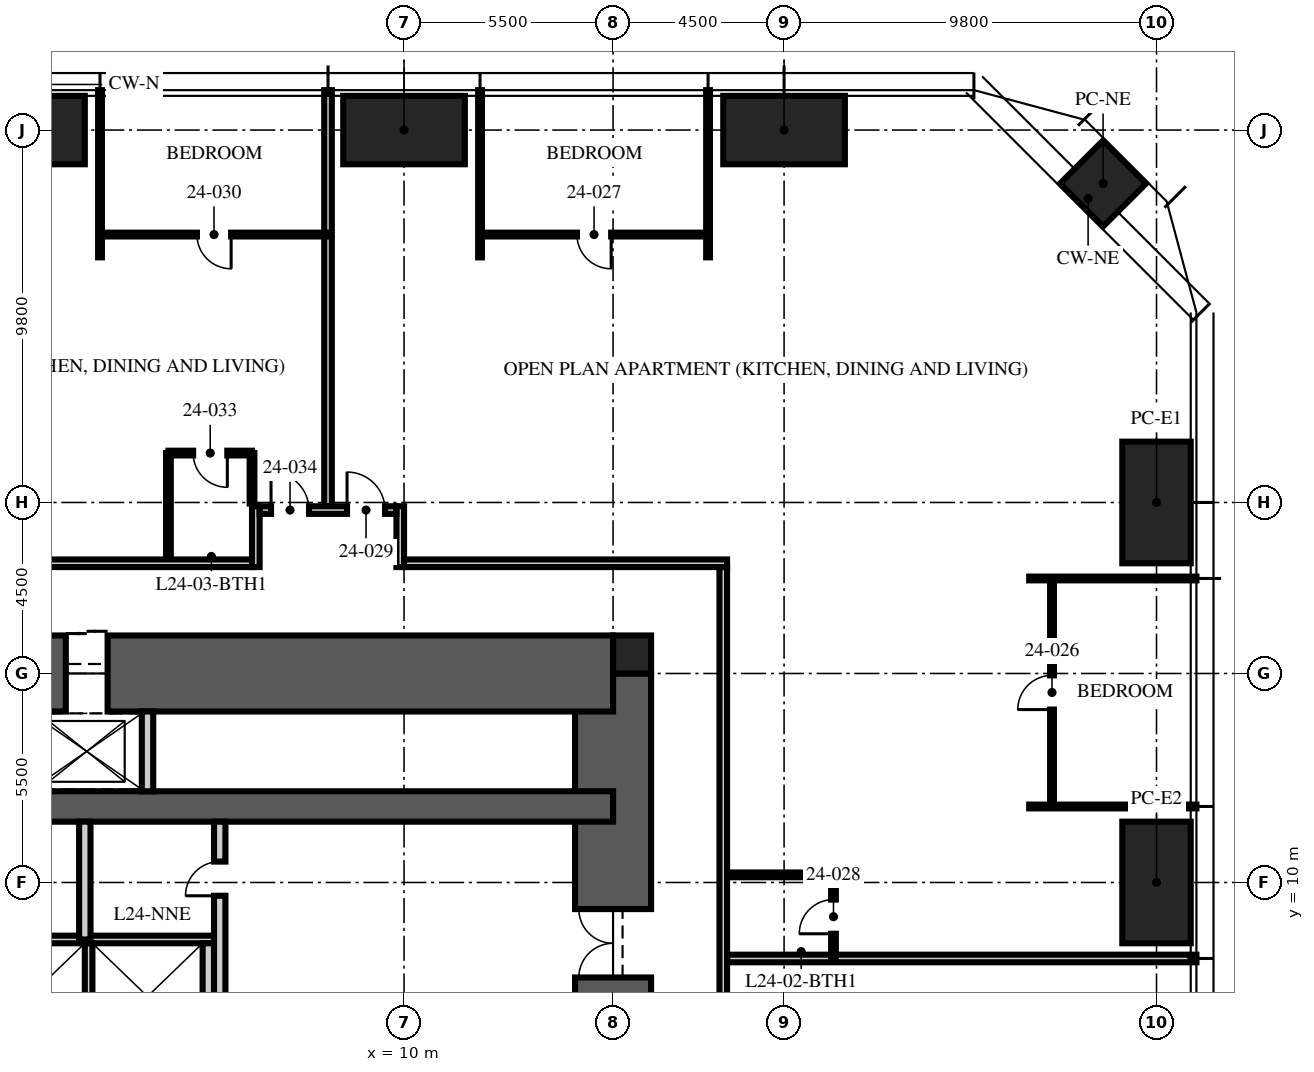
"""IFC4 building model, lengths in metres.
Left out: names, types, materials, properties, quantities, classifications, styles, units other than length and angle.
Written with IfcOpenShell. Run it as: python <this file> out.ifc"""

import sys

from ifc_helpers import new_model, si_unit, direction, frame, frame_2d, origin, origin_2d, place, context, subcontext, project, spatial, rectangle, hollow_rectangle, extrude, element, fill, save


model = new_model("IFC4")
c1 = context("Model", 3, precision=1e-05, world=origin(), true_north=direction((0.0, 1.0)))
c2 = subcontext(c1, "Body", "Model", "MODEL_VIEW")
j1 = project(units=[si_unit("LENGTHUNIT", "METRE"), si_unit("PLANEANGLEUNIT", "RADIAN")], contexts=[c1])
p1 = place(None, origin())
s1 = spatial("IfcSite", under=j1, at=p1, CompositionType="ELEMENT")
p2 = place(p1, origin())
s2 = spatial("IfcBuilding", under=s1, at=p2, CompositionType="ELEMENT")
p3 = place(p2, frame((0.0, 0.0, 96.0)))
s3 = spatial("IfcBuildingStorey", under=s2, at=p3, CompositionType="ELEMENT", Elevation=96.0)
p4 = place(p3, frame((15.5, -15.5, -0.25), z_axis=(0.0, 0.0, 1.0), x_axis=(0.0, 1.0, 0.0)))
e1 = element("IfcWall", 1, at=p4, inside=s3, PredefinedType="SHEAR", context=c2, shape_type="SweptSolid", body=[
    extrude(rectangle(XDim=31.0, YDim=2.0, at=frame_2d((15.5, 0.0))), origin(), (0.0, 0.0, 1.0), 3.65),
])
p5 = place(p4, frame((6.5, 0.0, 0.25)))
e2 = element("IfcOpeningElement", 2, at=p5, cuts=e1, PredefinedType="OPENING", context=c2, shape_type="SweptSolid", body=[
    extrude(rectangle(XDim=1.2, YDim=2.1, at=frame_2d((0.6, 1.05))), frame((0.0, 1.01, 0.0), z_axis=(0.0, -1.0, 0.0), x_axis=(1.0, 0.0, 0.0)), (0.0, 0.0, 1.0), 2.02),
])
p6 = place(p4, frame((23.0, 0.0, 0.25)))
e3 = element("IfcOpeningElement", 3, at=p6, cuts=e1, PredefinedType="OPENING", context=c2, shape_type="SweptSolid", body=[
    extrude(rectangle(XDim=1.8, YDim=2.1, at=frame_2d((0.9, 1.05))), frame((0.0, 1.01, 0.0), z_axis=(0.0, -1.0, 0.0), x_axis=(1.0, 0.0, 0.0)), (0.0, 0.0, 1.0), 2.02),
])
p7 = place(p3, frame((-15.5, 15.5, -0.25), z_axis=(0.0, 0.0, 1.0), x_axis=(1.0, 0.0, 0.0)))
e4 = element("IfcWall", 4, at=p7, inside=s3, PredefinedType="SHEAR", context=c2, shape_type="SweptSolid", body=[
    extrude(rectangle(XDim=31.0, YDim=2.0, at=frame_2d((15.5, 0.0))), origin(), (0.0, 0.0, 1.0), 3.65),
])
p8 = place(p7, frame((10.4, 0.0, 0.25)))
e5 = element("IfcOpeningElement", 5, at=p8, cuts=e4, PredefinedType="OPENING", context=c2, shape_type="SweptSolid", body=[
    extrude(rectangle(XDim=1.1, YDim=2.1, at=frame_2d((0.55, 1.05))), frame((0.0, 1.01, 0.0), z_axis=(0.0, -1.0, 0.0), x_axis=(1.0, 0.0, 0.0)), (0.0, 0.0, 1.0), 2.02),
])
p9 = place(p7, frame((13.5, 0.0, 0.25)))
e6 = element("IfcOpeningElement", 6, at=p9, cuts=e4, PredefinedType="OPENING", context=c2, shape_type="SweptSolid", body=[
    extrude(rectangle(XDim=1.1, YDim=2.1, at=frame_2d((0.55, 1.05))), frame((0.0, 1.01, 0.0), z_axis=(0.0, -1.0, 0.0), x_axis=(1.0, 0.0, 0.0)), (0.0, 0.0, 1.0), 2.02),
])
p10 = place(p7, frame((16.6, 0.0, 0.25)))
e7 = element("IfcOpeningElement", 7, at=p10, cuts=e4, PredefinedType="OPENING", context=c2, shape_type="SweptSolid", body=[
    extrude(rectangle(XDim=1.1, YDim=2.1, at=frame_2d((0.55, 1.05))), frame((0.0, 1.01, 0.0), z_axis=(0.0, -1.0, 0.0), x_axis=(1.0, 0.0, 0.0)), (0.0, 0.0, 1.0), 2.02),
])
p11 = place(p3, frame((-15.5, 12.0, -0.25), z_axis=(0.0, 0.0, 1.0), x_axis=(1.0, 0.0, 0.0)))
e8 = element("IfcWall", 8, at=p11, inside=s3, PredefinedType="SHEAR", context=c2, shape_type="SweptSolid", body=[
    extrude(rectangle(XDim=31.0, YDim=0.8, at=frame_2d((15.5, 0.0))), origin(), (0.0, 0.0, 1.0), 3.65),
])
p12 = place(p3, frame((16.0, 16.0, -0.25), z_axis=(0.0, 0.0, 1.0), x_axis=(1.0, 0.0, 0.0)))
e9 = element("IfcColumn", 9, at=p12, inside=s3, PredefinedType="COLUMN", context=c2, shape_type="SweptSolid", body=[
    extrude(rectangle(XDim=1.0, YDim=1.0, at=origin_2d()), origin(), (0.0, 0.0, 1.0), 3.65),
])
p13 = place(p3, frame((0.0, 29.8, 0.0), z_axis=(0.0, 0.0, 1.0), x_axis=(1.0, 0.0, 0.0)))
e10 = element("IfcColumn", 10, at=p13, inside=s3, PredefinedType="COLUMN", context=c2, shape_type="SweptSolid", body=[
    extrude(hollow_rectangle(XDim=3.2, YDim=1.8, WallThickness=0.2, at=origin_2d()), origin(), (0.0, 0.0, 1.0), 2.78),
])
p14 = place(p3, frame((10.0, 29.8, 0.0), z_axis=(0.0, 0.0, 1.0), x_axis=(1.0, 0.0, 0.0)))
e11 = element("IfcColumn", 11, at=p14, inside=s3, PredefinedType="COLUMN", context=c2, shape_type="SweptSolid", body=[
    extrude(hollow_rectangle(XDim=3.2, YDim=1.8, WallThickness=0.2, at=origin_2d()), origin(), (0.0, 0.0, 1.0), 2.62),
])
for number, where, z_axis, x_axis in (
    (12, (20.0, 29.8, 0.0), (0.0, 0.0, 1.0), (1.0, 0.0, 0.0)),
    (13, (29.8, 20.0, 0.0), (0.0, 0.0, 1.0), (0.0, 1.0, 0.0)),
):
    element("IfcColumn", number, at=place(p3, frame(where, z_axis=z_axis, x_axis=x_axis)), inside=s3, PredefinedType="COLUMN", context=c2, shape_type="SweptSolid", body=[
        extrude(hollow_rectangle(XDim=3.2, YDim=1.8, WallThickness=0.2, at=origin_2d()), origin(), (0.0, 0.0, 1.0), 2.47),
    ])
p15 = place(p3, frame((29.8, 10.0, 0.0), z_axis=(0.0, 0.0, 1.0), x_axis=(0.0, 1.0, 0.0)))
e14 = element("IfcColumn", 14, at=p15, inside=s3, PredefinedType="COLUMN", context=c2, shape_type="SweptSolid", body=[
    extrude(hollow_rectangle(XDim=3.2, YDim=1.8, WallThickness=0.2, at=origin_2d()), origin(), (0.0, 0.0, 1.0), 2.62),
])
p16 = place(p3, frame((28.394, 28.394, 0.0), z_axis=(0.0, 0.0, 1.0), x_axis=(0.707106781187, -0.707106781187, 0.0)))
e15 = element("IfcColumn", 15, at=p16, inside=s3, PredefinedType="COLUMN", context=c2, shape_type="SweptSolid", body=[
    extrude(hollow_rectangle(XDim=1.6, YDim=1.6, WallThickness=0.1, at=origin_2d()), origin(), (0.0, 0.0, 1.0), 2.74),
])
p17 = place(p3, frame((-4.7, 8.5, 0.0), z_axis=(0.0, 0.0, 1.0), x_axis=(1.0, 0.0, 0.0)))
e16 = element("IfcWall", 16, at=p17, inside=s3, PredefinedType="PARTITIONING", context=c2, shape_type="SweptSolid", body=[
    extrude(rectangle(XDim=9.7, YDim=0.2, at=frame_2d((4.85, 0.0))), origin(), (0.0, 0.0, 1.0), 3.4),
])
p18 = place(p3, frame((4.85, 5.6, 0.0), z_axis=(0.0, 0.0, 1.0), x_axis=(0.0, 1.0, 0.0)))
e17 = element("IfcWall", 17, at=p18, inside=s3, PredefinedType="PARTITIONING", context=c2, shape_type="SweptSolid", body=[
    extrude(rectangle(XDim=2.8, YDim=0.3, at=frame_2d((1.4, 0.0))), origin(), (0.0, 0.0, 1.0), 3.4),
])
p19 = place(p3, frame((1.7, 5.6, 0.0), z_axis=(0.0, 0.0, 1.0), x_axis=(0.0, 1.0, 0.0)))
e18 = element("IfcWall", 18, at=p19, inside=s3, PredefinedType="PARTITIONING", context=c2, shape_type="SweptSolid", body=[
    extrude(rectangle(XDim=2.8, YDim=0.2, at=frame_2d((1.4, 0.0))), origin(), (0.0, 0.0, 1.0), 3.4),
])
p20 = place(p3, frame((3.25, 12.4, 0.0), z_axis=(0.0, 0.0, 1.0), x_axis=(0.0, 1.0, 0.0)))
e19 = element("IfcWall", 19, at=p20, inside=s3, PredefinedType="PARTITIONING", context=c2, shape_type="SweptSolid", body=[
    extrude(rectangle(XDim=2.1, YDim=0.3, at=frame_2d((1.05, 0.0))), origin(), (0.0, 0.0, 1.0), 3.4),
])
p21 = place(p3, frame((5.15, 5.3, 0.0), z_axis=(0.0, 0.0, 1.0), x_axis=(0.0, 1.0, 0.0)))
e20 = element("IfcWall", 20, at=p21, inside=s3, PredefinedType="PARTITIONING", context=c2, shape_type="SweptSolid", body=[
    extrude(rectangle(XDim=6.3, YDim=0.3, at=frame_2d((3.15, 0.0))), origin(), (0.0, 0.0, 1.0), 3.4),
])
p22 = place(p21, frame((4.35, 0.0, 0.0)))
e21 = element("IfcOpeningElement", 21, at=p22, cuts=e20, PredefinedType="OPENING", context=c2, shape_type="SweptSolid", body=[
    extrude(rectangle(XDim=0.9, YDim=2.1, at=frame_2d((0.45, 1.05))), frame((0.0, 0.16, 0.0), z_axis=(0.0, -1.0, 0.0), x_axis=(1.0, 0.0, 0.0)), (0.0, 0.0, 1.0), 0.32),
])
p23 = place(p3, frame((1.6, 8.5, 0.0), z_axis=(0.0, 0.0, 1.0), x_axis=(0.0, 1.0, 0.0)))
e22 = element("IfcWall", 22, at=p23, inside=s3, PredefinedType="PARTITIONING", context=c2, shape_type="SweptSolid", body=[
    extrude(rectangle(XDim=3.1, YDim=0.3, at=frame_2d((1.55, 0.0))), origin(), (0.0, 0.0, 1.0), 3.4),
])
p24 = place(p3, frame((18.5, 8.0, 0.0), z_axis=(0.0, 0.0, 1.0), x_axis=(1.0, 0.0, 0.0)))
e23 = element("IfcWall", 23, at=p24, inside=s3, PredefinedType="PARTITIONING", context=c2, shape_type="SweptSolid", body=[
    extrude(rectangle(XDim=12.35, YDim=0.2, at=frame_2d((6.175, 0.0))), origin(), (0.0, 0.0, 1.0), 2.7),
])
for number, where, z_axis, x_axis in (
    (24, (26.45, 12.0, 0.0), (0.0, 0.0, 1.0), (1.0, 0.0, 0.0)),
    (25, (26.45, 18.0, 0.0), (0.0, 0.0, 1.0), (1.0, 0.0, 0.0)),
    (26, (18.0, 26.45, 0.0), (0.0, 0.0, 1.0), (0.0, 1.0, 0.0)),
    (27, (12.0, 26.45, 0.0), (0.0, 0.0, 1.0), (0.0, 1.0, 0.0)),
):
    element("IfcWall", number, at=place(p3, frame(where, z_axis=z_axis, x_axis=x_axis)), inside=s3, PredefinedType="PARTITIONING", context=c2, shape_type="SweptSolid", body=[
        extrude(rectangle(XDim=4.4, YDim=0.1, at=frame_2d((2.2, 0.0))), origin(), (0.0, 0.0, 1.0), 2.7),
    ])
p25 = place(p3, frame((8.0, 19.9, 0.0), z_axis=(0.0, 0.0, 1.0), x_axis=(0.0, 1.0, 0.0)))
e28 = element("IfcWall", 28, at=p25, inside=s3, PredefinedType="PARTITIONING", context=c2, shape_type="SweptSolid", body=[
    extrude(rectangle(XDim=10.95, YDim=0.2, at=frame_2d((5.475, 0.0))), origin(), (0.0, 0.0, 1.0), 2.7),
])
p26 = place(p3, frame((2.0, 26.45, 0.0), z_axis=(0.0, 0.0, 1.0), x_axis=(0.0, 1.0, 0.0)))
e29 = element("IfcWall", 29, at=p26, inside=s3, PredefinedType="PARTITIONING", context=c2, shape_type="SweptSolid", body=[
    extrude(rectangle(XDim=4.4, YDim=0.1, at=frame_2d((2.2, 0.0))), origin(), (0.0, 0.0, 1.0), 2.7),
])
p27 = place(p3, frame((27.05, 12.0, 0.0), z_axis=(0.0, 0.0, 1.0), x_axis=(0.0, 1.0, 0.0)))
e30 = element("IfcWall", 30, at=p27, inside=s3, PredefinedType="PARTITIONING", context=c2, shape_type="SweptSolid", body=[
    extrude(rectangle(XDim=6.0, YDim=0.1, at=frame_2d((3.0, 0.0))), origin(), (0.0, 0.0, 1.0), 2.2),
])
p28 = place(p27, frame((2.55, 0.0, 0.0)))
e31 = element("IfcOpeningElement", 31, at=p28, cuts=e30, PredefinedType="OPENING", context=c2, shape_type="SweptSolid", body=[
    extrude(rectangle(XDim=0.9, YDim=2.1, at=frame_2d((0.45, 1.05))), frame((0.0, 0.06, 0.0), z_axis=(0.0, -1.0, 0.0), x_axis=(1.0, 0.0, 0.0)), (0.0, 0.0, 1.0), 0.12),
])
p29 = place(p3, frame((18.0, 27.05, 0.0), z_axis=(0.0, 0.0, 1.0), x_axis=(-1.0, 0.0, 0.0)))
e32 = element("IfcWall", 32, at=p29, inside=s3, PredefinedType="PARTITIONING", context=c2, shape_type="SweptSolid", body=[
    extrude(rectangle(XDim=6.0, YDim=0.1, at=frame_2d((3.0, 0.0))), origin(), (0.0, 0.0, 1.0), 2.2),
])
p30 = place(p29, frame((2.55, 0.0, 0.0)))
e33 = element("IfcOpeningElement", 33, at=p30, cuts=e32, PredefinedType="OPENING", context=c2, shape_type="SweptSolid", body=[
    extrude(rectangle(XDim=0.9, YDim=2.1, at=frame_2d((0.45, 1.05))), frame((0.0, 0.06, 0.0), z_axis=(0.0, -1.0, 0.0), x_axis=(1.0, 0.0, 0.0)), (0.0, 0.0, 1.0), 0.12),
])
p31 = place(p3, frame((21.3, 8.0, 0.0), z_axis=(0.0, 0.0, 1.0), x_axis=(0.0, 1.0, 0.0)))
e34 = element("IfcWall", 34, at=p31, inside=s3, PredefinedType="PARTITIONING", context=c2, shape_type="SweptSolid", body=[
    extrude(rectangle(XDim=2.2, YDim=0.125, at=frame_2d((1.1, 0.0))), origin(), (0.0, 0.0, 1.0), 2.3),
])
p32 = place(p31, frame((0.65, 0.0, 0.0)))
e35 = element("IfcOpeningElement", 35, at=p32, cuts=e34, PredefinedType="OPENING", context=c2, shape_type="SweptSolid", body=[
    extrude(rectangle(XDim=0.9, YDim=2.1, at=frame_2d((0.45, 1.05))), frame((0.0, 0.073, 0.0), z_axis=(0.0, -1.0, 0.0), x_axis=(1.0, 0.0, 0.0)), (0.0, 0.0, 1.0), 0.145),
])
p33 = place(p3, frame((18.5, 10.2, 0.0), z_axis=(0.0, 0.0, 1.0), x_axis=(1.0, 0.0, 0.0)))
e36 = element("IfcWall", 36, at=p33, inside=s3, PredefinedType="PARTITIONING", context=c2, shape_type="SweptSolid", body=[
    extrude(rectangle(XDim=2.8, YDim=0.125, at=frame_2d((1.4, 0.0))), origin(), (0.0, 0.0, 1.0), 2.3),
])
p34 = place(p3, frame((8.0, 27.05, 0.0), z_axis=(0.0, 0.0, 1.0), x_axis=(-1.0, 0.0, 0.0)))
e37 = element("IfcWall", 37, at=p34, inside=s3, PredefinedType="PARTITIONING", context=c2, shape_type="SweptSolid", body=[
    extrude(rectangle(XDim=6.0, YDim=0.1, at=frame_2d((3.0, 0.0))), origin(), (0.0, 0.0, 1.0), 2.2),
])
p35 = place(p34, frame((2.55, 0.0, 0.0)))
e38 = element("IfcOpeningElement", 38, at=p35, cuts=e37, PredefinedType="OPENING", context=c2, shape_type="SweptSolid", body=[
    extrude(rectangle(XDim=0.9, YDim=2.1, at=frame_2d((0.45, 1.05))), frame((0.0, 0.06, 0.0), z_axis=(0.0, -1.0, 0.0), x_axis=(1.0, 0.0, 0.0)), (0.0, 0.0, 1.0), 0.12),
])
p36 = place(p3, frame((6.0, 21.3, 0.0), z_axis=(0.0, 0.0, 1.0), x_axis=(-1.0, 0.0, 0.0)))
e39 = element("IfcWall", 39, at=p36, inside=s3, PredefinedType="PARTITIONING", context=c2, shape_type="SweptSolid", body=[
    extrude(rectangle(XDim=2.2, YDim=0.125, at=frame_2d((1.1, 0.0))), origin(), (0.0, 0.0, 1.0), 2.2),
])
p37 = place(p36, frame((0.65, 0.0, 0.0)))
e40 = element("IfcOpeningElement", 40, at=p37, cuts=e39, PredefinedType="OPENING", context=c2, shape_type="SweptSolid", body=[
    extrude(rectangle(XDim=0.9, YDim=2.1, at=frame_2d((0.45, 1.05))), frame((0.0, 0.073, 0.0), z_axis=(0.0, -1.0, 0.0), x_axis=(1.0, 0.0, 0.0)), (0.0, 0.0, 1.0), 0.145),
])
p38 = place(p3, frame((6.0, 19.97, 0.0), z_axis=(0.0, 0.0, 1.0), x_axis=(0.0, 1.0, 0.0)))
e41 = element("IfcWall", 41, at=p38, inside=s3, PredefinedType="PARTITIONING", context=c2, shape_type="SweptSolid", body=[
    extrude(rectangle(XDim=1.33, YDim=0.125, at=frame_2d((0.665, 0.0))), origin(), (0.0, 0.0, 1.0), 3.4),
])
p39 = place(p3, frame((3.8, 18.5, 0.0), z_axis=(0.0, 0.0, 1.0), x_axis=(0.0, 1.0, 0.0)))
e42 = element("IfcWall", 42, at=p39, inside=s3, PredefinedType="PARTITIONING", context=c2, shape_type="SweptSolid", body=[
    extrude(rectangle(XDim=2.8, YDim=0.125, at=frame_2d((1.4, 0.0))), origin(), (0.0, 0.0, 1.0), 3.4),
])
p40 = place(p3, frame((18.4, -6.0, 0.0), z_axis=(0.0, 0.0, 1.0), x_axis=(0.0, 1.0, 0.0)))
e43 = element("IfcWall", 43, at=p40, inside=s3, PredefinedType="PARTITIONING", context=c2, shape_type="SweptSolid", body=[
    extrude(rectangle(XDim=24.3, YDim=0.2, at=frame_2d((12.15, 0.0))), origin(), (0.0, 0.0, 1.0), 2.2),
])
p41 = place(p3, frame((-18.5, 18.4, 0.0), z_axis=(0.0, 0.0, 1.0), x_axis=(1.0, 0.0, 0.0)))
e44 = element("IfcWall", 44, at=p41, inside=s3, PredefinedType="PARTITIONING", context=c2, shape_type="SweptSolid", body=[
    extrude(rectangle(XDim=24.5, YDim=0.2, at=frame_2d((12.25, 0.0))), origin(), (0.0, 0.0, 1.0), 2.2),
])
p42 = place(p41, frame((1.23, 0.0, 0.0)))
e45 = element("IfcOpeningElement", 45, at=p42, cuts=e44, PredefinedType="OPENING", context=c2, shape_type="SweptSolid", body=[
    extrude(rectangle(XDim=1.0, YDim=2.2, at=frame_2d((0.5, 1.1))), frame((0.0, 0.11, 0.0), z_axis=(0.0, -1.0, 0.0), x_axis=(1.0, 0.0, 0.0)), (0.0, 0.0, 1.0), 0.22),
])
p43 = place(p3, frame((6.1, 18.3, 0.0), z_axis=(0.0, 0.0, 1.0), x_axis=(0.0, 1.0, 0.0)))
e46 = element("IfcWall", 46, at=p43, inside=s3, PredefinedType="PARTITIONING", context=c2, shape_type="SweptSolid", body=[
    extrude(rectangle(XDim=1.6, YDim=0.2, at=frame_2d((0.8, 0.0))), origin(), (0.0, 0.0, 1.0), 3.4),
])
p44 = place(p3, frame((9.9, 18.3, 0.0), z_axis=(0.0, 0.0, 1.0), x_axis=(0.0, 1.0, 0.0)))
e47 = element("IfcWall", 47, at=p44, inside=s3, PredefinedType="PARTITIONING", context=c2, shape_type="SweptSolid", body=[
    extrude(rectangle(XDim=1.6, YDim=0.2, at=frame_2d((0.8, 0.0))), origin(), (0.0, 0.0, 1.0), 2.3),
])
p45 = place(p3, frame((6.2, 19.8, 0.0), z_axis=(0.0, 0.0, 1.0), x_axis=(1.0, 0.0, 0.0)))
e48 = element("IfcWall", 48, at=p45, inside=s3, PredefinedType="PARTITIONING", context=c2, shape_type="SweptSolid", body=[
    extrude(rectangle(XDim=3.6, YDim=0.2, at=frame_2d((1.8, 0.0))), origin(), (0.0, 0.0, 1.0), 2.3),
])
p46 = place(p45, frame((2.3, 0.0, 0.0)))
e49 = element("IfcOpeningElement", 49, at=p46, cuts=e48, PredefinedType="OPENING", context=c2, shape_type="SweptSolid", body=[
    extrude(rectangle(XDim=1.0, YDim=2.2, at=frame_2d((0.5, 1.1))), frame((0.0, 0.11, 0.0), z_axis=(0.0, -1.0, 0.0), x_axis=(1.0, 0.0, 0.0)), (0.0, 0.0, 1.0), 0.22),
])
p47 = place(p45, frame((0.3, 0.0, 0.0)))
e50 = element("IfcOpeningElement", 50, at=p47, cuts=e48, PredefinedType="OPENING", context=c2, shape_type="SweptSolid", body=[
    extrude(rectangle(XDim=1.0, YDim=2.2, at=frame_2d((0.5, 1.1))), frame((0.0, 0.11, 0.0), z_axis=(0.0, -1.0, 0.0), x_axis=(1.0, 0.0, 0.0)), (0.0, 0.0, 1.0), 0.22),
])
p48 = place(p3, frame((10.0, 18.4, 0.0), z_axis=(0.0, 0.0, 1.0), x_axis=(1.0, 0.0, 0.0)))
e51 = element("IfcWall", 51, at=p48, inside=s3, PredefinedType="PARTITIONING", context=c2, shape_type="SweptSolid", body=[
    extrude(rectangle(XDim=8.5, YDim=0.2, at=frame_2d((4.25, 0.0))), origin(), (0.0, 0.0, 1.0), 2.2),
])
p49 = place(p6, origin())
e52 = element("IfcDoor", 52, at=p49, inside=s3, OperationType="DOUBLE_DOOR_SINGLE_SWING", PredefinedType="DOOR", context=c2, shape_type="SweptSolid", body=[
    extrude(rectangle(XDim=1.8, YDim=2.1, at=frame_2d((0.9, 1.05))), frame((0.0, 0.025, 0.0), z_axis=(0.0, -1.0, 0.0), x_axis=(1.0, 0.0, 0.0)), (0.0, 0.0, 1.0), 0.05),
])
fill(e3, e52)
p50 = place(p10, origin())
e53 = element("IfcDoor", 53, at=p50, inside=s3, OperationType="DOUBLE_DOOR_SLIDING", PredefinedType="DOOR", context=c2, shape_type="SweptSolid", body=[
    extrude(rectangle(XDim=1.1, YDim=2.1, at=frame_2d((0.55, 1.05))), frame((0.0, 0.025, 0.0), z_axis=(0.0, -1.0, 0.0), x_axis=(1.0, 0.0, 0.0)), (0.0, 0.0, 1.0), 0.05),
])
fill(e7, e53)
p51 = place(p22, origin())
e54 = element("IfcDoor", 54, at=p51, inside=s3, OperationType="SINGLE_SWING_LEFT", PredefinedType="DOOR", context=c2, shape_type="SweptSolid", body=[
    extrude(rectangle(XDim=0.9, YDim=2.1, at=frame_2d((0.45, 1.05))), frame((0.0, 0.025, 0.0), z_axis=(0.0, -1.0, 0.0), x_axis=(1.0, 0.0, 0.0)), (0.0, 0.0, 1.0), 0.05),
])
fill(e21, e54)
p52 = place(p28, origin())
e55 = element("IfcDoor", 55, at=p52, inside=s3, OperationType="SINGLE_SWING_LEFT", PredefinedType="DOOR", context=c2, shape_type="SweptSolid", body=[
    extrude(rectangle(XDim=0.9, YDim=2.1, at=frame_2d((0.45, 1.05))), frame((0.0, 0.025, 0.0), z_axis=(0.0, -1.0, 0.0), x_axis=(1.0, 0.0, 0.0)), (0.0, 0.0, 1.0), 0.05),
])
fill(e31, e55)
p53 = place(p30, origin())
e56 = element("IfcDoor", 56, at=p53, inside=s3, OperationType="SINGLE_SWING_LEFT", PredefinedType="DOOR", context=c2, shape_type="SweptSolid", body=[
    extrude(rectangle(XDim=0.9, YDim=2.1, at=frame_2d((0.45, 1.05))), frame((0.0, 0.025, 0.0), z_axis=(0.0, -1.0, 0.0), x_axis=(1.0, 0.0, 0.0)), (0.0, 0.0, 1.0), 0.05),
])
fill(e33, e56)
p54 = place(p32, origin())
e57 = element("IfcDoor", 57, at=p54, inside=s3, OperationType="SINGLE_SWING_LEFT", PredefinedType="DOOR", context=c2, shape_type="SweptSolid", body=[
    extrude(rectangle(XDim=0.9, YDim=2.1, at=frame_2d((0.45, 1.05))), frame((0.0, 0.025, 0.0), z_axis=(0.0, -1.0, 0.0), x_axis=(1.0, 0.0, 0.0)), (0.0, 0.0, 1.0), 0.05),
])
fill(e35, e57)
p55 = place(p46, origin())
e58 = element("IfcDoor", 58, at=p55, inside=s3, OperationType="SINGLE_SWING_LEFT", PredefinedType="DOOR", context=c2, shape_type="SweptSolid", body=[
    extrude(rectangle(XDim=1.0, YDim=2.2, at=frame_2d((0.5, 1.1))), frame((0.0, 0.025, 0.0), z_axis=(0.0, -1.0, 0.0), x_axis=(1.0, 0.0, 0.0)), (0.0, 0.0, 1.0), 0.05),
])
fill(e49, e58)
p56 = place(p35, origin())
e59 = element("IfcDoor", 59, at=p56, inside=s3, OperationType="SINGLE_SWING_LEFT", PredefinedType="DOOR", context=c2, shape_type="SweptSolid", body=[
    extrude(rectangle(XDim=0.9, YDim=2.1, at=frame_2d((0.45, 1.05))), frame((0.0, 0.025, 0.0), z_axis=(0.0, -1.0, 0.0), x_axis=(1.0, 0.0, 0.0)), (0.0, 0.0, 1.0), 0.05),
])
fill(e38, e59)
p57 = place(p37, origin())
e60 = element("IfcDoor", 60, at=p57, inside=s3, OperationType="SINGLE_SWING_LEFT", PredefinedType="DOOR", context=c2, shape_type="SweptSolid", body=[
    extrude(rectangle(XDim=0.9, YDim=2.1, at=frame_2d((0.45, 1.05))), frame((0.0, 0.025, 0.0), z_axis=(0.0, -1.0, 0.0), x_axis=(1.0, 0.0, 0.0)), (0.0, 0.0, 1.0), 0.05),
])
fill(e40, e60)
p58 = place(p47, origin())
e61 = element("IfcDoor", 61, at=p58, inside=s3, OperationType="SINGLE_SWING_LEFT", PredefinedType="DOOR", context=c2, shape_type="SweptSolid", body=[
    extrude(rectangle(XDim=1.0, YDim=2.2, at=frame_2d((0.5, 1.1))), frame((0.0, 0.025, 0.0), z_axis=(0.0, -1.0, 0.0), x_axis=(1.0, 0.0, 0.0)), (0.0, 0.0, 1.0), 0.05),
])
fill(e50, e61)
save(model, sys.argv[1])
